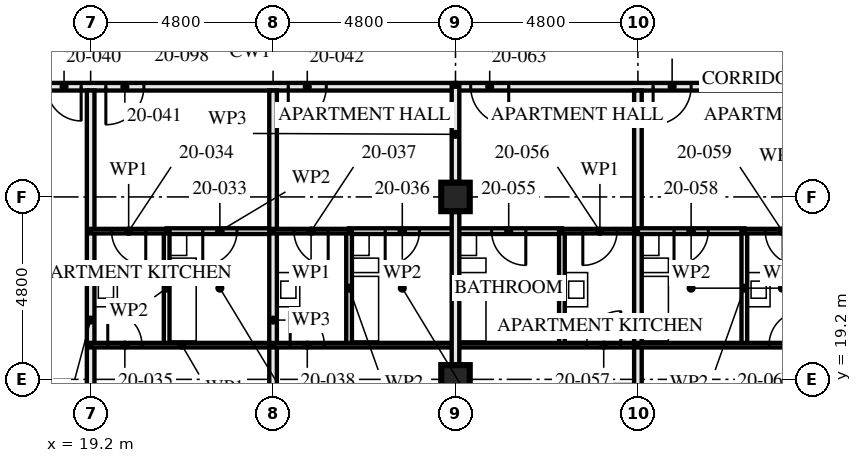
"""IFC4 building model, lengths in metres.
Left out: names, types, materials, properties, quantities, classifications, styles, units other than length and angle.
Written with IfcOpenShell. Run it as: python <this file> out.ifc"""

import sys

from ifc_helpers import new_model, si_unit, direction, frame, frame_2d, origin, origin_2d, place, context, subcontext, project, spatial, rectangle, hollow_rectangle, extrude, element, fill, save


model = new_model("IFC4")
c1 = context("Model", 3, precision=1e-05, world=origin(), true_north=direction((0.0, 1.0)))
c2 = subcontext(c1, "Body", "Model", "MODEL_VIEW")
j1 = project(units=[si_unit("LENGTHUNIT", "METRE"), si_unit("PLANEANGLEUNIT", "RADIAN")], contexts=[c1])
p1 = place(None, origin())
s1 = spatial("IfcSite", under=j1, at=p1, CompositionType="ELEMENT")
p2 = place(p1, origin())
s2 = spatial("IfcBuilding", under=s1, at=p2, CompositionType="ELEMENT")
p3 = place(p2, frame((0.0, 0.0, 76.0)))
s3 = spatial("IfcBuildingStorey", under=s2, at=p3, CompositionType="ELEMENT", Elevation=76.0)
for number, where, z_axis, x_axis in (
    (1, (28.8, 19.2, 0.0), (0.0, 0.0, 1.0), (1.0, 0.0, 0.0)),
    (2, (28.8, 24.0, 0.0), (0.0, 0.0, 1.0), (1.0, 0.0, 0.0)),
):
    element("IfcColumn", number, at=place(p3, frame(where, z_axis=z_axis, x_axis=x_axis)), inside=s3, PredefinedType="COLUMN", context=c2, shape_type="SweptSolid", body=[
        extrude(hollow_rectangle(XDim=0.75, YDim=0.75, WallThickness=0.08, at=origin_2d()), origin(), (0.0, 0.0, 1.0), 3.5),
    ])
p4 = place(p3, frame((19.2, 14.72, 0.0), z_axis=(0.0, 0.0, 1.0), x_axis=(0.0, 1.0, 0.0)))
e3 = element("IfcWall", 3, at=p4, inside=s3, PredefinedType="PARTITIONING", context=c2, shape_type="SweptSolid", body=[
    extrude(rectangle(XDim=12.08, YDim=0.2, at=frame_2d((6.04, 0.0))), origin(), (0.0, 0.0, 1.0), 2.04),
])
p5 = place(p3, frame((21.2, 20.1, 0.0), z_axis=(0.0, 0.0, 1.0), x_axis=(0.0, 1.0, 0.0)))
e4 = element("IfcWall", 4, at=p5, inside=s3, PredefinedType="PARTITIONING", context=c2, shape_type="SweptSolid", body=[
    extrude(rectangle(XDim=3.0, YDim=0.15, at=frame_2d((1.5, 0.0))), origin(), (0.0, 0.0, 1.0), 3.25),
])
p6 = place(p3, frame((21.2, 23.1, 0.0), z_axis=(0.0, 0.0, 1.0), x_axis=(1.0, 0.0, 0.0)))
e5 = element("IfcWall", 5, at=p6, inside=s3, PredefinedType="PARTITIONING", context=c2, shape_type="SweptSolid", body=[
    extrude(rectangle(XDim=2.8, YDim=0.15, at=frame_2d((1.4, 0.0))), origin(), (0.0, 0.0, 1.0), 3.25),
])
p7 = place(p6, frame((0.95, 0.0, 0.0)))
e6 = element("IfcOpeningElement", 6, at=p7, cuts=e5, PredefinedType="OPENING", context=c2, shape_type="SweptSolid", body=[
    extrude(rectangle(XDim=0.9, YDim=2.1, at=frame_2d((0.45, 1.05))), frame((0.0, 0.085, 0.0), z_axis=(0.0, -1.0, 0.0), x_axis=(1.0, 0.0, 0.0)), (0.0, 0.0, 1.0), 0.171),
])
p8 = place(p3, frame((19.2, 23.1, 0.0), z_axis=(0.0, 0.0, 1.0), x_axis=(1.0, 0.0, 0.0)))
e7 = element("IfcWall", 7, at=p8, inside=s3, PredefinedType="PARTITIONING", context=c2, shape_type="SweptSolid", body=[
    extrude(rectangle(XDim=2.0, YDim=0.12, at=frame_2d((1.0, 0.0))), origin(), (0.0, 0.0, 1.0), 3.25),
])
p9 = place(p8, frame((0.55, 0.0, 0.0)))
e8 = element("IfcOpeningElement", 8, at=p9, cuts=e7, PredefinedType="OPENING", context=c2, shape_type="SweptSolid", body=[
    extrude(rectangle(XDim=0.9, YDim=2.1, at=frame_2d((0.45, 1.05))), frame((0.0, 0.071, 0.0), z_axis=(0.0, -1.0, 0.0), x_axis=(1.0, 0.0, 0.0)), (0.0, 0.0, 1.0), 0.141),
])
p10 = place(p3, frame((19.2, 20.1, 0.0), z_axis=(0.0, 0.0, 1.0), x_axis=(1.0, 0.0, 0.0)))
e9 = element("IfcWall", 9, at=p10, inside=s3, PredefinedType="PARTITIONING", context=c2, shape_type="SweptSolid", body=[
    extrude(rectangle(XDim=4.8, YDim=0.12, at=frame_2d((2.4, 0.0))), origin(), (0.0, 0.0, 1.0), 3.25),
])
p11 = place(p10, frame((0.45, 0.0, 0.0)))
e10 = element("IfcOpeningElement", 10, at=p11, cuts=e9, PredefinedType="OPENING", context=c2, shape_type="SweptSolid", body=[
    extrude(rectangle(XDim=0.9, YDim=2.1, at=frame_2d((0.45, 1.05))), frame((0.0, 0.071, 0.0), z_axis=(0.0, -1.0, 0.0), x_axis=(1.0, 0.0, 0.0)), (0.0, 0.0, 1.0), 0.141),
])
p12 = place(p3, frame((24.0, 14.72, 0.0), z_axis=(0.0, 0.0, 1.0), x_axis=(0.0, 1.0, 0.0)))
e11 = element("IfcWall", 11, at=p12, inside=s3, PredefinedType="PARTITIONING", context=c2, shape_type="SweptSolid", body=[
    extrude(rectangle(XDim=12.08, YDim=0.2, at=frame_2d((6.04, 0.0))), origin(), (0.0, 0.0, 1.0), 2.04),
])
p13 = place(p3, frame((26.0, 20.1, 0.0), z_axis=(0.0, 0.0, 1.0), x_axis=(0.0, 1.0, 0.0)))
e12 = element("IfcWall", 12, at=p13, inside=s3, PredefinedType="PARTITIONING", context=c2, shape_type="SweptSolid", body=[
    extrude(rectangle(XDim=3.0, YDim=0.15, at=frame_2d((1.5, 0.0))), origin(), (0.0, 0.0, 1.0), 3.25),
])
p14 = place(p3, frame((26.0, 23.1, 0.0), z_axis=(0.0, 0.0, 1.0), x_axis=(1.0, 0.0, 0.0)))
e13 = element("IfcWall", 13, at=p14, inside=s3, PredefinedType="PARTITIONING", context=c2, shape_type="SweptSolid", body=[
    extrude(rectangle(XDim=2.8, YDim=0.15, at=frame_2d((1.4, 0.0))), origin(), (0.0, 0.0, 1.0), 3.25),
])
p15 = place(p14, frame((0.95, 0.0, 0.0)))
e14 = element("IfcOpeningElement", 14, at=p15, cuts=e13, PredefinedType="OPENING", context=c2, shape_type="SweptSolid", body=[
    extrude(rectangle(XDim=0.9, YDim=2.1, at=frame_2d((0.45, 1.05))), frame((0.0, 0.085, 0.0), z_axis=(0.0, -1.0, 0.0), x_axis=(1.0, 0.0, 0.0)), (0.0, 0.0, 1.0), 0.171),
])
p16 = place(p3, frame((24.0, 23.1, 0.0), z_axis=(0.0, 0.0, 1.0), x_axis=(1.0, 0.0, 0.0)))
e15 = element("IfcWall", 15, at=p16, inside=s3, PredefinedType="PARTITIONING", context=c2, shape_type="SweptSolid", body=[
    extrude(rectangle(XDim=2.0, YDim=0.12, at=frame_2d((1.0, 0.0))), origin(), (0.0, 0.0, 1.0), 3.25),
])
p17 = place(p16, frame((0.55, 0.0, 0.0)))
e16 = element("IfcOpeningElement", 16, at=p17, cuts=e15, PredefinedType="OPENING", context=c2, shape_type="SweptSolid", body=[
    extrude(rectangle(XDim=0.9, YDim=2.1, at=frame_2d((0.45, 1.05))), frame((0.0, 0.071, 0.0), z_axis=(0.0, -1.0, 0.0), x_axis=(1.0, 0.0, 0.0)), (0.0, 0.0, 1.0), 0.141),
])
p18 = place(p3, frame((24.0, 20.1, 0.0), z_axis=(0.0, 0.0, 1.0), x_axis=(1.0, 0.0, 0.0)))
e17 = element("IfcWall", 17, at=p18, inside=s3, PredefinedType="PARTITIONING", context=c2, shape_type="SweptSolid", body=[
    extrude(rectangle(XDim=4.8, YDim=0.12, at=frame_2d((2.4, 0.0))), origin(), (0.0, 0.0, 1.0), 3.25),
])
p19 = place(p18, frame((0.45, 0.0, 0.0)))
e18 = element("IfcOpeningElement", 18, at=p19, cuts=e17, PredefinedType="OPENING", context=c2, shape_type="SweptSolid", body=[
    extrude(rectangle(XDim=0.9, YDim=2.1, at=frame_2d((0.45, 1.05))), frame((0.0, 0.071, 0.0), z_axis=(0.0, -1.0, 0.0), x_axis=(1.0, 0.0, 0.0)), (0.0, 0.0, 1.0), 0.141),
])
p20 = place(p3, frame((14.4, 26.9, 0.0), z_axis=(0.0, 0.0, 1.0), x_axis=(1.0, 0.0, 0.0)))
e19 = element("IfcWall", 19, at=p20, inside=s3, PredefinedType="PARTITIONING", context=c2, shape_type="SweptSolid", body=[
    extrude(rectangle(XDim=14.4, YDim=0.2, at=frame_2d((7.2, 0.0))), origin(), (0.0, 0.0, 1.0), 2.04),
])
p21 = place(p20, frame((1.4, 0.0, 0.0)))
e20 = element("IfcOpeningElement", 20, at=p21, cuts=e19, PredefinedType="OPENING", context=c2, shape_type="SweptSolid", body=[
    extrude(rectangle(XDim=1.0, YDim=2.0, at=frame_2d((0.5, 1.0))), frame((0.0, 0.111, 0.0), z_axis=(0.0, -1.0, 0.0), x_axis=(1.0, 0.0, 0.0)), (0.0, 0.0, 1.0), 0.221),
])
p22 = place(p20, frame((3.65, 0.0, 0.0)))
e21 = element("IfcOpeningElement", 21, at=p22, cuts=e19, PredefinedType="OPENING", context=c2, shape_type="SweptSolid", body=[
    extrude(rectangle(XDim=0.9, YDim=2.0, at=frame_2d((0.45, 1.0))), frame((0.0, 0.111, 0.0), z_axis=(0.0, -1.0, 0.0), x_axis=(1.0, 0.0, 0.0)), (0.0, 0.0, 1.0), 0.221),
])
p23 = place(p20, frame((5.2, 0.0, 0.0)))
e22 = element("IfcOpeningElement", 22, at=p23, cuts=e19, PredefinedType="OPENING", context=c2, shape_type="SweptSolid", body=[
    extrude(rectangle(XDim=1.0, YDim=2.0, at=frame_2d((0.5, 1.0))), frame((0.0, 0.111, 0.0), z_axis=(0.0, -1.0, 0.0), x_axis=(1.0, 0.0, 0.0)), (0.0, 0.0, 1.0), 0.221),
])
p24 = place(p20, frame((10.0, 0.0, 0.0)))
e23 = element("IfcOpeningElement", 23, at=p24, cuts=e19, PredefinedType="OPENING", context=c2, shape_type="SweptSolid", body=[
    extrude(rectangle(XDim=1.0, YDim=2.0, at=frame_2d((0.5, 1.0))), frame((0.0, 0.111, 0.0), z_axis=(0.0, -1.0, 0.0), x_axis=(1.0, 0.0, 0.0)), (0.0, 0.0, 1.0), 0.221),
])
p25 = place(p3, frame((31.6, 20.1, 0.0), z_axis=(0.0, 0.0, 1.0), x_axis=(0.0, 1.0, 0.0)))
e24 = element("IfcWall", 24, at=p25, inside=s3, PredefinedType="PARTITIONING", context=c2, shape_type="SweptSolid", body=[
    extrude(rectangle(XDim=3.0, YDim=0.15, at=frame_2d((1.5, 0.0))), origin(), (0.0, 0.0, 1.0), 3.25),
])
p26 = place(p3, frame((28.8, 23.1, 0.0), z_axis=(0.0, 0.0, 1.0), x_axis=(1.0, 0.0, 0.0)))
e25 = element("IfcWall", 25, at=p26, inside=s3, PredefinedType="PARTITIONING", context=c2, shape_type="SweptSolid", body=[
    extrude(rectangle(XDim=2.8, YDim=0.15, at=frame_2d((1.4, 0.0))), origin(), (0.0, 0.0, 1.0), 3.25),
])
p27 = place(p26, frame((0.95, 0.0, 0.0)))
e26 = element("IfcOpeningElement", 26, at=p27, cuts=e25, PredefinedType="OPENING", context=c2, shape_type="SweptSolid", body=[
    extrude(rectangle(XDim=0.9, YDim=2.1, at=frame_2d((0.45, 1.05))), frame((0.0, 0.085, 0.0), z_axis=(0.0, -1.0, 0.0), x_axis=(1.0, 0.0, 0.0)), (0.0, 0.0, 1.0), 0.171),
])
p28 = place(p3, frame((31.6, 23.1, 0.0), z_axis=(0.0, 0.0, 1.0), x_axis=(1.0, 0.0, 0.0)))
e27 = element("IfcWall", 27, at=p28, inside=s3, PredefinedType="PARTITIONING", context=c2, shape_type="SweptSolid", body=[
    extrude(rectangle(XDim=2.0, YDim=0.12, at=frame_2d((1.0, 0.0))), origin(), (0.0, 0.0, 1.0), 3.25),
])
p29 = place(p28, frame((0.55, 0.0, 0.0)))
e28 = element("IfcOpeningElement", 28, at=p29, cuts=e27, PredefinedType="OPENING", context=c2, shape_type="SweptSolid", body=[
    extrude(rectangle(XDim=0.9, YDim=2.1, at=frame_2d((0.45, 1.05))), frame((0.0, 0.071, 0.0), z_axis=(0.0, -1.0, 0.0), x_axis=(1.0, 0.0, 0.0)), (0.0, 0.0, 1.0), 0.141),
])
p30 = place(p3, frame((28.8, 20.1, 0.0), z_axis=(0.0, 0.0, 1.0), x_axis=(1.0, 0.0, 0.0)))
e29 = element("IfcWall", 29, at=p30, inside=s3, PredefinedType="PARTITIONING", context=c2, shape_type="SweptSolid", body=[
    extrude(rectangle(XDim=4.8, YDim=0.12, at=frame_2d((2.4, 0.0))), origin(), (0.0, 0.0, 1.0), 3.25),
])
p31 = place(p30, frame((3.45, 0.0, 0.0)))
e30 = element("IfcOpeningElement", 30, at=p31, cuts=e29, PredefinedType="OPENING", context=c2, shape_type="SweptSolid", body=[
    extrude(rectangle(XDim=0.9, YDim=2.1, at=frame_2d((0.45, 1.05))), frame((0.0, 0.071, 0.0), z_axis=(0.0, -1.0, 0.0), x_axis=(1.0, 0.0, 0.0)), (0.0, 0.0, 1.0), 0.141),
])
p32 = place(p3, frame((33.6, 14.72, 0.0), z_axis=(0.0, 0.0, 1.0), x_axis=(0.0, 1.0, 0.0)))
e31 = element("IfcWall", 31, at=p32, inside=s3, PredefinedType="PARTITIONING", context=c2, shape_type="SweptSolid", body=[
    extrude(rectangle(XDim=12.08, YDim=0.2, at=frame_2d((6.04, 0.0))), origin(), (0.0, 0.0, 1.0), 2.04),
])
p33 = place(p3, frame((36.4, 20.1, 0.0), z_axis=(0.0, 0.0, 1.0), x_axis=(0.0, 1.0, 0.0)))
e32 = element("IfcWall", 32, at=p33, inside=s3, PredefinedType="PARTITIONING", context=c2, shape_type="SweptSolid", body=[
    extrude(rectangle(XDim=3.0, YDim=0.15, at=frame_2d((1.5, 0.0))), origin(), (0.0, 0.0, 1.0), 3.25),
])
p34 = place(p3, frame((33.6, 23.1, 0.0), z_axis=(0.0, 0.0, 1.0), x_axis=(1.0, 0.0, 0.0)))
e33 = element("IfcWall", 33, at=p34, inside=s3, PredefinedType="PARTITIONING", context=c2, shape_type="SweptSolid", body=[
    extrude(rectangle(XDim=2.8, YDim=0.15, at=frame_2d((1.4, 0.0))), origin(), (0.0, 0.0, 1.0), 3.25),
])
p35 = place(p34, frame((0.95, 0.0, 0.0)))
e34 = element("IfcOpeningElement", 34, at=p35, cuts=e33, PredefinedType="OPENING", context=c2, shape_type="SweptSolid", body=[
    extrude(rectangle(XDim=0.9, YDim=2.1, at=frame_2d((0.45, 1.05))), frame((0.0, 0.085, 0.0), z_axis=(0.0, -1.0, 0.0), x_axis=(1.0, 0.0, 0.0)), (0.0, 0.0, 1.0), 0.171),
])
p36 = place(p3, frame((36.4, 23.1, 0.0), z_axis=(0.0, 0.0, 1.0), x_axis=(1.0, 0.0, 0.0)))
e35 = element("IfcWall", 35, at=p36, inside=s3, PredefinedType="PARTITIONING", context=c2, shape_type="SweptSolid", body=[
    extrude(rectangle(XDim=2.0, YDim=0.12, at=frame_2d((1.0, 0.0))), origin(), (0.0, 0.0, 1.0), 3.25),
])
p37 = place(p36, frame((0.55, 0.0, 0.0)))
e36 = element("IfcOpeningElement", 36, at=p37, cuts=e35, PredefinedType="OPENING", context=c2, shape_type="SweptSolid", body=[
    extrude(rectangle(XDim=0.9, YDim=2.1, at=frame_2d((0.45, 1.05))), frame((0.0, 0.071, 0.0), z_axis=(0.0, -1.0, 0.0), x_axis=(1.0, 0.0, 0.0)), (0.0, 0.0, 1.0), 0.141),
])
p38 = place(p3, frame((33.6, 20.1, 0.0), z_axis=(0.0, 0.0, 1.0), x_axis=(1.0, 0.0, 0.0)))
e37 = element("IfcWall", 37, at=p38, inside=s3, PredefinedType="PARTITIONING", context=c2, shape_type="SweptSolid", body=[
    extrude(rectangle(XDim=4.8, YDim=0.12, at=frame_2d((2.4, 0.0))), origin(), (0.0, 0.0, 1.0), 3.25),
])
p39 = place(p38, frame((3.45, 0.0, 0.0)))
e38 = element("IfcOpeningElement", 38, at=p39, cuts=e37, PredefinedType="OPENING", context=c2, shape_type="SweptSolid", body=[
    extrude(rectangle(XDim=0.9, YDim=2.1, at=frame_2d((0.45, 1.05))), frame((0.0, 0.071, 0.0), z_axis=(0.0, -1.0, 0.0), x_axis=(1.0, 0.0, 0.0)), (0.0, 0.0, 1.0), 0.141),
])
p40 = place(p3, frame((28.8, 26.9, 0.0), z_axis=(0.0, 0.0, 1.0), x_axis=(1.0, 0.0, 0.0)))
e39 = element("IfcWall", 39, at=p40, inside=s3, PredefinedType="PARTITIONING", context=c2, shape_type="SweptSolid", body=[
    extrude(rectangle(XDim=9.6, YDim=0.2, at=frame_2d((4.8, 0.0))), origin(), (0.0, 0.0, 1.0), 3.25),
])
p41 = place(p40, frame((0.4, 0.0, 0.0)))
e40 = element("IfcOpeningElement", 40, at=p41, cuts=e39, PredefinedType="OPENING", context=c2, shape_type="SweptSolid", body=[
    extrude(rectangle(XDim=1.0, YDim=2.1, at=frame_2d((0.5, 1.05))), frame((0.0, 0.111, 0.0), z_axis=(0.0, -1.0, 0.0), x_axis=(1.0, 0.0, 0.0)), (0.0, 0.0, 1.0), 0.221),
])
p42 = place(p40, frame((5.2, 0.0, 0.0)))
e41 = element("IfcOpeningElement", 41, at=p42, cuts=e39, PredefinedType="OPENING", context=c2, shape_type="SweptSolid", body=[
    extrude(rectangle(XDim=1.0, YDim=2.1, at=frame_2d((0.5, 1.05))), frame((0.0, 0.111, 0.0), z_axis=(0.0, -1.0, 0.0), x_axis=(1.0, 0.0, 0.0)), (0.0, 0.0, 1.0), 0.221),
])
p43 = place(p3, frame((28.8, 19.595, 0.0), z_axis=(0.0, 0.0, 1.0), x_axis=(0.0, 1.0, 0.0)))
e42 = element("IfcWall", 42, at=p43, inside=s3, PredefinedType="PARTITIONING", context=c2, shape_type="SweptSolid", body=[
    extrude(rectangle(XDim=4.01, YDim=0.2, at=frame_2d((2.005, 0.0))), origin(), (0.0, 0.0, 1.0), 2.04),
])
p44 = place(p3, frame((28.8, 24.395, 0.0), z_axis=(0.0, 0.0, 1.0), x_axis=(0.0, 1.0, 0.0)))
e43 = element("IfcWall", 43, at=p44, inside=s3, PredefinedType="PARTITIONING", context=c2, shape_type="SweptSolid", body=[
    extrude(rectangle(XDim=2.505, YDim=0.2, at=frame_2d((1.252, 0.0))), origin(), (0.0, 0.0, 1.0), 2.04),
])
p45 = place(p7, frame((0.9, 0.0, 0.0), z_axis=(0.0, 0.0, 1.0), x_axis=(-1.0, 0.0, 0.0)))
e44 = element("IfcDoor", 44, at=p45, inside=s3, OperationType="SINGLE_SWING_LEFT", PredefinedType="DOOR", context=c2, shape_type="SweptSolid", body=[
    extrude(rectangle(XDim=0.9, YDim=2.1, at=frame_2d((0.45, 1.05))), frame((0.0, 0.022, 0.0), z_axis=(0.0, -1.0, 0.0), x_axis=(1.0, 0.0, 0.0)), (0.0, 0.0, 1.0), 0.044),
])
fill(e6, e44)
p46 = place(p9, frame((0.9, 0.0, 0.0), z_axis=(0.0, 0.0, 1.0), x_axis=(-1.0, 0.0, 0.0)))
e45 = element("IfcDoor", 45, at=p46, inside=s3, OperationType="SINGLE_SWING_RIGHT", PredefinedType="DOOR", context=c2, shape_type="SweptSolid", body=[
    extrude(rectangle(XDim=0.9, YDim=2.1, at=frame_2d((0.45, 1.05))), frame((0.0, 0.022, 0.0), z_axis=(0.0, -1.0, 0.0), x_axis=(1.0, 0.0, 0.0)), (0.0, 0.0, 1.0), 0.044),
])
fill(e8, e45)
p47 = place(p11, origin())
e46 = element("IfcDoor", 46, at=p47, inside=s3, OperationType="SINGLE_SWING_RIGHT", PredefinedType="DOOR", context=c2, shape_type="SweptSolid", body=[
    extrude(rectangle(XDim=0.9, YDim=2.1, at=frame_2d((0.45, 1.05))), frame((0.0, 0.022, 0.0), z_axis=(0.0, -1.0, 0.0), x_axis=(1.0, 0.0, 0.0)), (0.0, 0.0, 1.0), 0.044),
])
fill(e10, e46)
p48 = place(p15, frame((0.9, 0.0, 0.0), z_axis=(0.0, 0.0, 1.0), x_axis=(-1.0, 0.0, 0.0)))
e47 = element("IfcDoor", 47, at=p48, inside=s3, OperationType="SINGLE_SWING_LEFT", PredefinedType="DOOR", context=c2, shape_type="SweptSolid", body=[
    extrude(rectangle(XDim=0.9, YDim=2.1, at=frame_2d((0.45, 1.05))), frame((0.0, 0.022, 0.0), z_axis=(0.0, -1.0, 0.0), x_axis=(1.0, 0.0, 0.0)), (0.0, 0.0, 1.0), 0.044),
])
fill(e14, e47)
p49 = place(p17, frame((0.9, 0.0, 0.0), z_axis=(0.0, 0.0, 1.0), x_axis=(-1.0, 0.0, 0.0)))
e48 = element("IfcDoor", 48, at=p49, inside=s3, OperationType="SINGLE_SWING_RIGHT", PredefinedType="DOOR", context=c2, shape_type="SweptSolid", body=[
    extrude(rectangle(XDim=0.9, YDim=2.1, at=frame_2d((0.45, 1.05))), frame((0.0, 0.022, 0.0), z_axis=(0.0, -1.0, 0.0), x_axis=(1.0, 0.0, 0.0)), (0.0, 0.0, 1.0), 0.044),
])
fill(e16, e48)
p50 = place(p19, origin())
e49 = element("IfcDoor", 49, at=p50, inside=s3, OperationType="SINGLE_SWING_RIGHT", PredefinedType="DOOR", context=c2, shape_type="SweptSolid", body=[
    extrude(rectangle(XDim=0.9, YDim=2.1, at=frame_2d((0.45, 1.05))), frame((0.0, 0.022, 0.0), z_axis=(0.0, -1.0, 0.0), x_axis=(1.0, 0.0, 0.0)), (0.0, 0.0, 1.0), 0.044),
])
fill(e18, e49)
p51 = place(p22, frame((0.9, 0.0, 0.0), z_axis=(0.0, 0.0, 1.0), x_axis=(-1.0, 0.0, 0.0)))
e50 = element("IfcDoor", 50, at=p51, inside=s3, OperationType="SINGLE_SWING_RIGHT", PredefinedType="DOOR", context=c2, shape_type="SweptSolid", body=[
    extrude(rectangle(XDim=0.9, YDim=2.0, at=frame_2d((0.45, 1.0))), frame((0.0, 0.027, 0.0), z_axis=(0.0, -1.0, 0.0), x_axis=(1.0, 0.0, 0.0)), (0.0, 0.0, 1.0), 0.054),
])
fill(e21, e50)
p52 = place(p23, frame((1.0, 0.0, 0.0), z_axis=(0.0, 0.0, 1.0), x_axis=(-1.0, 0.0, 0.0)))
e51 = element("IfcDoor", 51, at=p52, inside=s3, OperationType="SINGLE_SWING_LEFT", PredefinedType="DOOR", context=c2, shape_type="SweptSolid", body=[
    extrude(rectangle(XDim=1.0, YDim=2.0, at=frame_2d((0.5, 1.0))), frame((0.0, 0.027, 0.0), z_axis=(0.0, -1.0, 0.0), x_axis=(1.0, 0.0, 0.0)), (0.0, 0.0, 1.0), 0.054),
])
fill(e22, e51)
p53 = place(p24, frame((1.0, 0.0, 0.0), z_axis=(0.0, 0.0, 1.0), x_axis=(-1.0, 0.0, 0.0)))
e52 = element("IfcDoor", 52, at=p53, inside=s3, OperationType="SINGLE_SWING_LEFT", PredefinedType="DOOR", context=c2, shape_type="SweptSolid", body=[
    extrude(rectangle(XDim=1.0, YDim=2.0, at=frame_2d((0.5, 1.0))), frame((0.0, 0.027, 0.0), z_axis=(0.0, -1.0, 0.0), x_axis=(1.0, 0.0, 0.0)), (0.0, 0.0, 1.0), 0.054),
])
fill(e23, e52)
p54 = place(p27, frame((0.9, 0.0, 0.0), z_axis=(0.0, 0.0, 1.0), x_axis=(-1.0, 0.0, 0.0)))
e53 = element("IfcDoor", 53, at=p54, inside=s3, OperationType="SINGLE_SWING_RIGHT", PredefinedType="DOOR", context=c2, shape_type="SweptSolid", body=[
    extrude(rectangle(XDim=0.9, YDim=2.1, at=frame_2d((0.45, 1.05))), frame((0.0, 0.022, 0.0), z_axis=(0.0, -1.0, 0.0), x_axis=(1.0, 0.0, 0.0)), (0.0, 0.0, 1.0), 0.044),
])
fill(e26, e53)
p55 = place(p29, frame((0.9, 0.0, 0.0), z_axis=(0.0, 0.0, 1.0), x_axis=(-1.0, 0.0, 0.0)))
e54 = element("IfcDoor", 54, at=p55, inside=s3, OperationType="SINGLE_SWING_LEFT", PredefinedType="DOOR", context=c2, shape_type="SweptSolid", body=[
    extrude(rectangle(XDim=0.9, YDim=2.1, at=frame_2d((0.45, 1.05))), frame((0.0, 0.022, 0.0), z_axis=(0.0, -1.0, 0.0), x_axis=(1.0, 0.0, 0.0)), (0.0, 0.0, 1.0), 0.044),
])
fill(e28, e54)
p56 = place(p31, origin())
e55 = element("IfcDoor", 55, at=p56, inside=s3, OperationType="SINGLE_SWING_LEFT", PredefinedType="DOOR", context=c2, shape_type="SweptSolid", body=[
    extrude(rectangle(XDim=0.9, YDim=2.1, at=frame_2d((0.45, 1.05))), frame((0.0, 0.022, 0.0), z_axis=(0.0, -1.0, 0.0), x_axis=(1.0, 0.0, 0.0)), (0.0, 0.0, 1.0), 0.044),
])
fill(e30, e55)
p57 = place(p35, frame((0.9, 0.0, 0.0), z_axis=(0.0, 0.0, 1.0), x_axis=(-1.0, 0.0, 0.0)))
e56 = element("IfcDoor", 56, at=p57, inside=s3, OperationType="SINGLE_SWING_LEFT", PredefinedType="DOOR", context=c2, shape_type="SweptSolid", body=[
    extrude(rectangle(XDim=0.9, YDim=2.1, at=frame_2d((0.45, 1.05))), frame((0.0, 0.022, 0.0), z_axis=(0.0, -1.0, 0.0), x_axis=(1.0, 0.0, 0.0)), (0.0, 0.0, 1.0), 0.044),
])
fill(e34, e56)
p58 = place(p37, frame((0.9, 0.0, 0.0), z_axis=(0.0, 0.0, 1.0), x_axis=(-1.0, 0.0, 0.0)))
e57 = element("IfcDoor", 57, at=p58, inside=s3, OperationType="SINGLE_SWING_RIGHT", PredefinedType="DOOR", context=c2, shape_type="SweptSolid", body=[
    extrude(rectangle(XDim=0.9, YDim=2.1, at=frame_2d((0.45, 1.05))), frame((0.0, 0.022, 0.0), z_axis=(0.0, -1.0, 0.0), x_axis=(1.0, 0.0, 0.0)), (0.0, 0.0, 1.0), 0.044),
])
fill(e36, e57)
p59 = place(p39, origin())
e58 = element("IfcDoor", 58, at=p59, inside=s3, OperationType="SINGLE_SWING_LEFT", PredefinedType="DOOR", context=c2, shape_type="SweptSolid", body=[
    extrude(rectangle(XDim=0.9, YDim=2.1, at=frame_2d((0.45, 1.05))), frame((0.0, 0.022, 0.0), z_axis=(0.0, -1.0, 0.0), x_axis=(1.0, 0.0, 0.0)), (0.0, 0.0, 1.0), 0.044),
])
fill(e38, e58)
p60 = place(p41, frame((1.0, 0.0, 0.0), z_axis=(0.0, 0.0, 1.0), x_axis=(-1.0, 0.0, 0.0)))
e59 = element("IfcDoor", 59, at=p60, inside=s3, OperationType="SINGLE_SWING_RIGHT", PredefinedType="DOOR", context=c2, shape_type="SweptSolid", body=[
    extrude(rectangle(XDim=1.0, YDim=2.1, at=frame_2d((0.5, 1.05))), frame((0.0, 0.027, 0.0), z_axis=(0.0, -1.0, 0.0), x_axis=(1.0, 0.0, 0.0)), (0.0, 0.0, 1.0), 0.054),
])
fill(e40, e59)
p61 = place(p42, frame((1.0, 0.0, 0.0), z_axis=(0.0, 0.0, 1.0), x_axis=(-1.0, 0.0, 0.0)))
e60 = element("IfcDoor", 60, at=p61, inside=s3, OperationType="SINGLE_SWING_LEFT", PredefinedType="DOOR", context=c2, shape_type="SweptSolid", body=[
    extrude(rectangle(XDim=1.0, YDim=2.1, at=frame_2d((0.5, 1.05))), frame((0.0, 0.027, 0.0), z_axis=(0.0, -1.0, 0.0), x_axis=(1.0, 0.0, 0.0)), (0.0, 0.0, 1.0), 0.054),
])
fill(e41, e60)
save(model, sys.argv[1])
